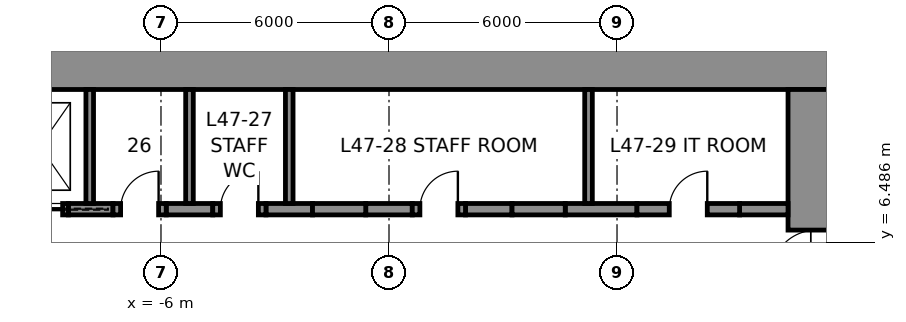
"""IFC4 building model, lengths in metres.
Left out: names, types, materials, properties, quantities, classifications, styles, units other than length and angle.
Written with IfcOpenShell. Run it as: python <this file> out.ifc"""

import sys

from ifc_helpers import new_model, si_unit, direction, frame, frame_2d, origin, place, context, subcontext, project, spatial, rectangle, extrude, element, fill, save


model = new_model("IFC4")
c1 = context("Model", 3, precision=1e-05, world=origin(), true_north=direction((0.0, 1.0)))
c2 = subcontext(c1, "Body", "Model", "MODEL_VIEW")
j1 = project(units=[si_unit("LENGTHUNIT", "METRE"), si_unit("PLANEANGLEUNIT", "RADIAN")], contexts=[c1])
p1 = place(None, origin())
s1 = spatial("IfcSite", under=j1, at=p1, CompositionType="ELEMENT")
p2 = place(p1, origin())
s2 = spatial("IfcBuilding", under=s1, at=p2, CompositionType="ELEMENT")
p3 = place(p2, frame((0.0, 0.0, 217.8)))
s3 = spatial("IfcBuildingStorey", under=s2, at=p3, CompositionType="ELEMENT", Elevation=217.8)
p4 = place(p3, frame((-12.0, 11.25, 0.0), z_axis=(0.0, 0.0, 1.0), x_axis=(1.0, 0.0, 0.0)))
e1 = element("IfcWall", 1, at=p4, inside=s3, PredefinedType="SHEAR", context=c2, shape_type="SweptSolid", body=[
    extrude(rectangle(XDim=24.0, YDim=1.5, at=frame_2d((12.0, 0.0))), origin(), (0.0, 0.0, 1.0), 4.0),
])
p5 = place(p3, frame((11.25, 10.5, 0.0), z_axis=(0.0, 0.0, 1.0), x_axis=(0.0, -1.0, 0.0)))
e2 = element("IfcWall", 2, at=p5, inside=s3, PredefinedType="SHEAR", context=c2, shape_type="SweptSolid", body=[
    extrude(rectangle(XDim=21.0, YDim=1.5, at=frame_2d((10.5, 0.0))), origin(), (0.0, 0.0, 1.0), 4.0),
])
p6 = place(p5, frame((3.7, 0.0, 0.0)))
e3 = element("IfcOpeningElement", 3, at=p6, cuts=e2, PredefinedType="OPENING", context=c2, shape_type="SweptSolid", body=[
    extrude(rectangle(XDim=1.2, YDim=2.3, at=frame_2d((0.6, 1.15))), frame((0.0, 0.76, 0.0), z_axis=(0.0, -1.0, 0.0), x_axis=(1.0, 0.0, 0.0)), (0.0, 0.0, 1.0), 1.52),
])
p7 = place(p5, frame((16.1, 0.0, 0.0)))
e4 = element("IfcOpeningElement", 4, at=p7, cuts=e2, PredefinedType="OPENING", context=c2, shape_type="SweptSolid", body=[
    extrude(rectangle(XDim=1.2, YDim=2.3, at=frame_2d((0.6, 1.15))), frame((0.0, 0.76, 0.0), z_axis=(0.0, -1.0, 0.0), x_axis=(1.0, 0.0, 0.0)), (0.0, 0.0, 1.0), 1.52),
])
p8 = place(p3, frame((-8.438, 7.35, 0.0), z_axis=(0.0, 0.0, 1.0), x_axis=(1.0, 0.0, 0.0)))
e5 = element("IfcWall", 5, at=p8, inside=s3, PredefinedType="SHEAR", context=c2, shape_type="SweptSolid", body=[
    extrude(rectangle(XDim=1.175, YDim=0.3, at=frame_2d((0.587, 0.0))), origin(), (0.0, 0.0, 1.0), 4.0),
])
for number, where, z_axis, x_axis in (
    (6, (-5.863, 7.35, 0.0), (0.0, 0.0, 1.0), (1.0, 0.0, 0.0)),
    (7, (-3.238, 7.35, 0.0), (0.0, 0.0, 1.0), (1.0, 0.0, 0.0)),
    (8, (-0.613, 7.35, 0.0), (0.0, 0.0, 1.0), (1.0, 0.0, 0.0)),
    (9, (2.012, 7.35, 0.0), (0.0, 0.0, 1.0), (1.0, 0.0, 0.0)),
):
    element("IfcWall", number, at=place(p3, frame(where, z_axis=z_axis, x_axis=x_axis)), inside=s3, PredefinedType="SHEAR", context=c2, shape_type="SweptSolid", body=[
        extrude(rectangle(XDim=1.225, YDim=0.3, at=frame_2d((0.613, 0.0))), origin(), (0.0, 0.0, 1.0), 4.0),
    ])
p9 = place(p3, frame((4.637, 7.35, 0.0), z_axis=(0.0, 0.0, 1.0), x_axis=(1.0, 0.0, 0.0)))
e10 = element("IfcWall", 10, at=p9, inside=s3, PredefinedType="SHEAR", context=c2, shape_type="SweptSolid", body=[
    extrude(rectangle(XDim=1.887, YDim=0.3, at=frame_2d((0.944, 0.0))), origin(), (0.0, 0.0, 1.0), 4.0),
])
p10 = place(p3, frame((9.225, 7.35, 0.0), z_axis=(0.0, 0.0, 1.0), x_axis=(1.0, 0.0, 0.0)))
e11 = element("IfcWall", 11, at=p10, inside=s3, PredefinedType="SHEAR", context=c2, shape_type="SweptSolid", body=[
    extrude(rectangle(XDim=1.275, YDim=0.3, at=frame_2d((0.637, 0.0))), origin(), (0.0, 0.0, 1.0), 4.0),
])
p11 = place(p3, frame((-9.938, 7.35, 0.0), z_axis=(0.0, 0.0, 1.0), x_axis=(1.0, 0.0, 0.0)))
e12 = element("IfcWall", 12, at=p11, inside=s3, PredefinedType="PARTITIONING", context=c2, shape_type="SweptSolid", body=[
    extrude(rectangle(XDim=1.5, YDim=0.3, at=frame_2d((0.75, 0.0))), origin(), (0.0, 0.0, 1.0), 4.0),
])
p12 = place(p11, frame((0.15, 0.0, 0.0)))
e13 = element("IfcOpeningElement", 13, at=p12, cuts=e12, PredefinedType="OPENING", context=c2, shape_type="SweptSolid", body=[
    extrude(rectangle(XDim=1.2, YDim=2.3, at=frame_2d((0.6, 1.15))), frame((0.0, 0.16, 0.0), z_axis=(0.0, -1.0, 0.0), x_axis=(1.0, 0.0, 0.0)), (0.0, 0.0, 1.0), 0.32),
])
p13 = place(p3, frame((-7.262, 7.35, 0.0), z_axis=(0.0, 0.0, 1.0), x_axis=(1.0, 0.0, 0.0)))
e14 = element("IfcWall", 14, at=p13, inside=s3, PredefinedType="PARTITIONING", context=c2, shape_type="SweptSolid", body=[
    extrude(rectangle(XDim=1.4, YDim=0.3, at=frame_2d((0.7, 0.0))), origin(), (0.0, 0.0, 1.0), 4.0),
])
p14 = place(p13, frame((0.2, 0.0, 0.0)))
e15 = element("IfcOpeningElement", 15, at=p14, cuts=e14, PredefinedType="OPENING", context=c2, shape_type="SweptSolid", body=[
    extrude(rectangle(XDim=1.0, YDim=2.3, at=frame_2d((0.5, 1.15))), frame((0.0, 0.16, 0.0), z_axis=(0.0, -1.0, 0.0), x_axis=(1.0, 0.0, 0.0)), (0.0, 0.0, 1.0), 0.32),
])
p15 = place(p3, frame((-4.637, 7.35, 0.0), z_axis=(0.0, 0.0, 1.0), x_axis=(1.0, 0.0, 0.0)))
e16 = element("IfcWall", 16, at=p15, inside=s3, PredefinedType="PARTITIONING", context=c2, shape_type="SweptSolid", body=[
    extrude(rectangle(XDim=1.4, YDim=0.3, at=frame_2d((0.7, 0.0))), origin(), (0.0, 0.0, 1.0), 4.0),
])
p16 = place(p15, frame((0.2, 0.0, 0.0)))
e17 = element("IfcOpeningElement", 17, at=p16, cuts=e16, PredefinedType="OPENING", context=c2, shape_type="SweptSolid", body=[
    extrude(rectangle(XDim=1.0, YDim=2.3, at=frame_2d((0.5, 1.15))), frame((0.0, 0.16, 0.0), z_axis=(0.0, -1.0, 0.0), x_axis=(1.0, 0.0, 0.0)), (0.0, 0.0, 1.0), 0.32),
])
p17 = place(p3, frame((-2.012, 7.35, 0.0), z_axis=(0.0, 0.0, 1.0), x_axis=(1.0, 0.0, 0.0)))
e18 = element("IfcWall", 18, at=p17, inside=s3, PredefinedType="PARTITIONING", context=c2, shape_type="SweptSolid", body=[
    extrude(rectangle(XDim=1.4, YDim=0.3, at=frame_2d((0.7, 0.0))), origin(), (0.0, 0.0, 1.0), 4.0),
])
p18 = place(p3, frame((0.613, 7.35, 0.0), z_axis=(0.0, 0.0, 1.0), x_axis=(1.0, 0.0, 0.0)))
e19 = element("IfcWall", 19, at=p18, inside=s3, PredefinedType="PARTITIONING", context=c2, shape_type="SweptSolid", body=[
    extrude(rectangle(XDim=1.4, YDim=0.3, at=frame_2d((0.7, 0.0))), origin(), (0.0, 0.0, 1.0), 4.0),
])
p19 = place(p18, frame((0.2, 0.0, 0.0)))
e20 = element("IfcOpeningElement", 20, at=p19, cuts=e19, PredefinedType="OPENING", context=c2, shape_type="SweptSolid", body=[
    extrude(rectangle(XDim=1.0, YDim=2.3, at=frame_2d((0.5, 1.15))), frame((0.0, 0.16, 0.0), z_axis=(0.0, -1.0, 0.0), x_axis=(1.0, 0.0, 0.0)), (0.0, 0.0, 1.0), 0.32),
])
p20 = place(p3, frame((3.238, 7.35, 0.0), z_axis=(0.0, 0.0, 1.0), x_axis=(1.0, 0.0, 0.0)))
e21 = element("IfcWall", 21, at=p20, inside=s3, PredefinedType="PARTITIONING", context=c2, shape_type="SweptSolid", body=[
    extrude(rectangle(XDim=1.4, YDim=0.3, at=frame_2d((0.7, 0.0))), origin(), (0.0, 0.0, 1.0), 4.0),
])
p21 = place(p3, frame((6.525, 7.35, 0.0), z_axis=(0.0, 0.0, 1.0), x_axis=(1.0, 0.0, 0.0)))
e22 = element("IfcWall", 22, at=p21, inside=s3, PredefinedType="PARTITIONING", context=c2, shape_type="SweptSolid", body=[
    extrude(rectangle(XDim=2.7, YDim=0.3, at=frame_2d((1.35, 0.0))), origin(), (0.0, 0.0, 1.0), 4.0),
])
p22 = place(p21, frame((0.85, 0.0, 0.0)))
e23 = element("IfcOpeningElement", 23, at=p22, cuts=e22, PredefinedType="OPENING", context=c2, shape_type="SweptSolid", body=[
    extrude(rectangle(XDim=1.0, YDim=2.3, at=frame_2d((0.5, 1.15))), frame((0.0, 0.16, 0.0), z_axis=(0.0, -1.0, 0.0), x_axis=(1.0, 0.0, 0.0)), (0.0, 0.0, 1.0), 0.32),
])
for number, where, z_axis, x_axis in (
    (24, (-7.875, 7.5, 0.0), (0.0, 0.0, 1.0), (0.0, 1.0, 0.0)),
    (25, (-5.25, 7.5, 0.0), (0.0, 0.0, 1.0), (0.0, 1.0, 0.0)),
    (26, (-2.625, 7.5, 0.0), (0.0, 0.0, 1.0), (0.0, 1.0, 0.0)),
    (27, (5.25, 7.5, 0.0), (0.0, 0.0, 1.0), (0.0, 1.0, 0.0)),
):
    element("IfcWall", number, at=place(p3, frame(where, z_axis=z_axis, x_axis=x_axis)), inside=s3, PredefinedType="PARTITIONING", context=c2, shape_type="SweptSolid", body=[
        extrude(rectangle(XDim=3.0, YDim=0.2, at=frame_2d((1.5, 0.0))), origin(), (0.0, 0.0, 1.0), 4.0),
    ])
p23 = place(p14, origin())
e28 = element("IfcDoor", 28, at=p23, inside=s3, OperationType="SINGLE_SWING_RIGHT", PredefinedType="DOOR", context=c2, shape_type="SweptSolid", body=[
    extrude(rectangle(XDim=1.0, YDim=2.3, at=frame_2d((0.5, 1.15))), frame((0.0, 0.025, 0.0), z_axis=(0.0, -1.0, 0.0), x_axis=(1.0, 0.0, 0.0)), (0.0, 0.0, 1.0), 0.05),
])
fill(e15, e28)
p24 = place(p16, origin())
e29 = element("IfcDoor", 29, at=p24, inside=s3, OperationType="SINGLE_SWING_RIGHT", PredefinedType="DOOR", context=c2, shape_type="SweptSolid", body=[
    extrude(rectangle(XDim=1.0, YDim=2.3, at=frame_2d((0.5, 1.15))), frame((0.0, 0.025, 0.0), z_axis=(0.0, -1.0, 0.0), x_axis=(1.0, 0.0, 0.0)), (0.0, 0.0, 1.0), 0.05),
])
fill(e17, e29)
p25 = place(p19, origin())
e30 = element("IfcDoor", 30, at=p25, inside=s3, OperationType="SINGLE_SWING_RIGHT", PredefinedType="DOOR", context=c2, shape_type="SweptSolid", body=[
    extrude(rectangle(XDim=1.0, YDim=2.3, at=frame_2d((0.5, 1.15))), frame((0.0, 0.025, 0.0), z_axis=(0.0, -1.0, 0.0), x_axis=(1.0, 0.0, 0.0)), (0.0, 0.0, 1.0), 0.05),
])
fill(e20, e30)
p26 = place(p22, origin())
e31 = element("IfcDoor", 31, at=p26, inside=s3, OperationType="SINGLE_SWING_RIGHT", PredefinedType="DOOR", context=c2, shape_type="SweptSolid", body=[
    extrude(rectangle(XDim=1.0, YDim=2.3, at=frame_2d((0.5, 1.15))), frame((0.0, 0.025, 0.0), z_axis=(0.0, -1.0, 0.0), x_axis=(1.0, 0.0, 0.0)), (0.0, 0.0, 1.0), 0.05),
])
fill(e23, e31)
p27 = place(p6, frame((1.2, 0.0, 0.0), z_axis=(0.0, 0.0, 1.0), x_axis=(-1.0, 0.0, 0.0)))
e32 = element("IfcDoor", 32, at=p27, inside=s3, OperationType="SINGLE_SWING_LEFT", PredefinedType="DOOR", context=c2, shape_type="SweptSolid", body=[
    extrude(rectangle(XDim=1.2, YDim=2.3, at=frame_2d((0.6, 1.15))), frame((0.0, 0.025, 0.0), z_axis=(0.0, -1.0, 0.0), x_axis=(1.0, 0.0, 0.0)), (0.0, 0.0, 1.0), 0.05),
])
fill(e3, e32)
p28 = place(p12, frame((1.2, 0.0, 0.0), z_axis=(0.0, 0.0, 1.0), x_axis=(-1.0, 0.0, 0.0)))
e33 = element("IfcDoor", 33, at=p28, inside=s3, OperationType="SLIDING_TO_LEFT", PredefinedType="DOOR", context=c2, shape_type="SweptSolid", body=[
    extrude(rectangle(XDim=1.2, YDim=2.3, at=frame_2d((0.6, 1.15))), frame((0.0, 0.025, 0.0), z_axis=(0.0, -1.0, 0.0), x_axis=(1.0, 0.0, 0.0)), (0.0, 0.0, 1.0), 0.05),
])
fill(e13, e33)
save(model, sys.argv[1])
